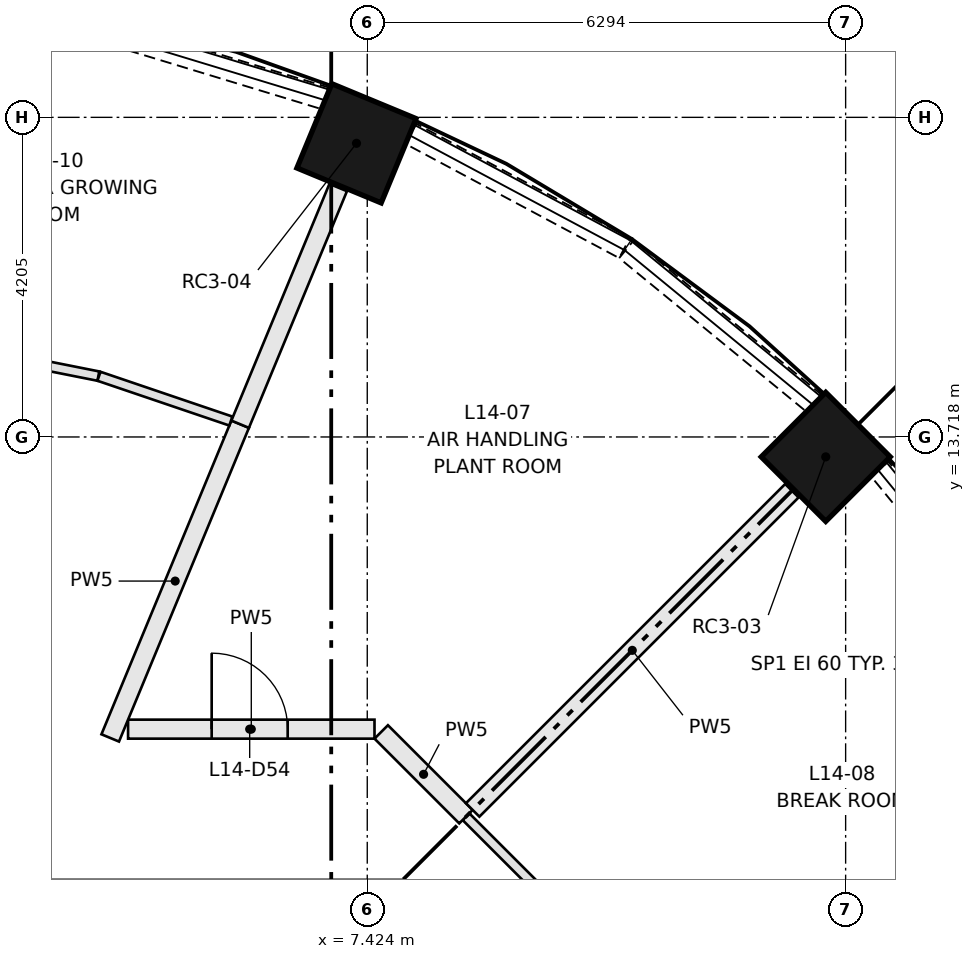
"""IFC4 building model, lengths in metres.
Left out: names, types, materials, properties, quantities, classifications, styles, units other than length and angle.
Written with IfcOpenShell. Run it as: python <this file> out.ifc"""

import sys

from ifc_helpers import new_model, si_unit, direction, frame, frame_2d, origin, origin_2d, place, context, subcontext, project, spatial, rectangle, extrude, element, fill, save


model = new_model("IFC4")
c1 = context("Model", 3, precision=1e-05, world=origin(), true_north=direction((0.0, 1.0)))
c2 = subcontext(c1, "Body", "Model", "MODEL_VIEW")
j1 = project(units=[si_unit("LENGTHUNIT", "METRE"), si_unit("PLANEANGLEUNIT", "RADIAN")], contexts=[c1])
p1 = place(None, origin())
s1 = spatial("IfcSite", under=j1, at=p1, CompositionType="ELEMENT")
p2 = place(p1, origin())
s2 = spatial("IfcBuilding", under=s1, at=p2, CompositionType="ELEMENT")
p3 = place(p2, frame((0.0, 0.0, 55.4)))
s3 = spatial("IfcBuildingStorey", under=s2, at=p3, CompositionType="ELEMENT", Elevation=55.4)
for number, where, z_axis, x_axis in (
    (1, (13.456, 13.456, 0.0), (0.0, 0.0, 1.0), (0.707, 0.707, 0.0)),
    (2, (7.282, 17.582, 0.0), (0.0, 0.0, 1.0), (0.383, 0.924, 0.0)),
):
    element("IfcColumn", number, at=place(p3, frame(where, z_axis=z_axis, x_axis=x_axis)), inside=s3, PredefinedType="COLUMN", context=c2, shape_type="SweptSolid", body=[
        extrude(rectangle(XDim=1.2, YDim=1.2, at=origin_2d()), origin(), (0.0, 0.0, 1.0), 3.65),
    ])
for number, where, z_axis, x_axis in (
    (3, (16.188, 10.833, 0.0), (0.0, 0.0, 1.0), (-0.634, 0.773, 0.0)),
    (4, (13.298, 14.166, 0.0), (0.0, 0.0, 1.0), (-0.773, 0.634, 0.0)),
):
    element("IfcWall", number, at=place(p3, frame(where, z_axis=z_axis, x_axis=x_axis)), inside=s3, PredefinedType="SOLIDWALL", context=c2, shape_type="SweptSolid", body=[
        extrude(rectangle(XDim=3.188, YDim=0.3, at=frame_2d((1.594, 0.0))), origin(), (0.0, 0.0, 1.0), 0.9),
    ])
p4 = place(p3, frame((10.809, 16.204, 0.0), z_axis=(0.0, 0.0, 1.0), x_axis=(-0.881994263934, 0.471260138764, 0.0)))
e5 = element("IfcWall", 5, at=p4, inside=s3, PredefinedType="SOLIDWALL", context=c2, shape_type="SweptSolid", body=[
    extrude(rectangle(XDim=3.187, YDim=0.3, at=frame_2d((1.593, 0.0))), origin(), (0.0, 0.0, 1.0), 0.9),
])
p5 = place(p3, frame((6.865, 18.175, 0.0), z_axis=(0.0, 0.0, 1.0), x_axis=(-0.956849017819, 0.290585541792, 0.0)))
e6 = element("IfcWall", 6, at=p5, inside=s3, PredefinedType="SOLIDWALL", context=c2, shape_type="SweptSolid", body=[
    extrude(rectangle(XDim=3.188, YDim=0.3, at=frame_2d((1.594, 0.0))), origin(), (0.0, 0.0, 1.0), 0.9),
])
p6 = place(p3, frame((8.722, 8.722, 0.0), z_axis=(0.0, 0.0, 1.0), x_axis=(0.70718294931, -0.707030604857, 0.0)))
e7 = element("IfcWall", 7, at=p6, inside=s3, PredefinedType="PARTITIONING", context=c2, shape_type="SweptSolid", body=[
    extrude(rectangle(XDim=1.603, YDim=0.125, at=frame_2d((0.801, 0.0))), origin(), (0.0, 0.0, 1.0), 3.3),
])
p7 = place(p3, frame((4.277, 9.874, 0.0), z_axis=(0.0, 0.0, 1.0), x_axis=(1.0, 0.0, 0.0)))
e8 = element("IfcWall", 8, at=p7, inside=s3, PredefinedType="PARTITIONING", context=c2, shape_type="SweptSolid", body=[
    extrude(rectangle(XDim=3.242, YDim=0.25, at=frame_2d((1.621, 0.0))), origin(), (0.0, 0.0, 1.0), 3.3),
])
p8 = place(p7, frame((1.1, 0.0, 0.0)))
e9 = element("IfcOpeningElement", 9, at=p8, cuts=e8, PredefinedType="OPENING", context=c2, shape_type="SweptSolid", body=[
    extrude(rectangle(XDim=1.0, YDim=2.1, at=frame_2d((0.5, 1.05))), frame((0.0, 0.135, 0.0), z_axis=(0.0, -1.0, 0.0), x_axis=(1.0, 0.0, 0.0)), (0.0, 0.0, 1.0), 0.27),
])
p9 = place(p3, frame((7.608, 9.837, 0.0), z_axis=(0.0, 0.0, 1.0), x_axis=(0.707029353672, -0.707184200224, 0.0)))
e10 = element("IfcWall", 10, at=p9, inside=s3, PredefinedType="PARTITIONING", context=c2, shape_type="SweptSolid", body=[
    extrude(rectangle(XDim=1.577, YDim=0.25, at=frame_2d((0.788, 0.0))), origin(), (0.0, 0.0, 1.0), 3.3),
])
p10 = place(p3, frame((13.011, 13.011, 0.0), z_axis=(0.0, 0.0, 1.0), x_axis=(-0.707106781187, -0.707106781187, 0.0)))
e11 = element("IfcWall", 11, at=p10, inside=s3, PredefinedType="PARTITIONING", context=c2, shape_type="SweptSolid", body=[
    extrude(rectangle(XDim=5.94, YDim=0.25, at=frame_2d((2.97, 0.0))), origin(), (0.0, 0.0, 1.0), 3.3),
])
p11 = place(p3, frame((4.042, 9.759, 0.0), z_axis=(0.0, 0.0, 1.0), x_axis=(0.382697682956, 0.923873629595, 0.0)))
e12 = element("IfcWall", 12, at=p11, inside=s3, PredefinedType="PARTITIONING", context=c2, shape_type="SweptSolid", body=[
    extrude(rectangle(XDim=4.468, YDim=0.25, at=frame_2d((2.234, 0.0))), origin(), (0.0, 0.0, 1.0), 3.3),
])
p12 = place(p3, frame((5.752, 13.886, 0.0), z_axis=(0.0, 0.0, 1.0), x_axis=(0.382716478617, 0.923865843613, 0.0)))
e13 = element("IfcWall", 13, at=p12, inside=s3, PredefinedType="PARTITIONING", context=c2, shape_type="SweptSolid", body=[
    extrude(rectangle(XDim=3.37, YDim=0.25, at=frame_2d((1.685, 0.0))), origin(), (0.0, 0.0, 1.0), 3.3),
])
p13 = place(p3, frame((1.966, 14.901, 0.0), z_axis=(0.0, 0.0, 1.0), x_axis=(0.980795915473, -0.19503684829, 0.0)))
e14 = element("IfcWall", 14, at=p13, inside=s3, PredefinedType="PARTITIONING", context=c2, shape_type="SweptSolid", body=[
    extrude(rectangle(XDim=1.958, YDim=0.125, at=frame_2d((0.979, 0.0))), origin(), (0.0, 0.0, 1.0), 3.3),
])
p14 = place(p3, frame((3.894, 14.517, 0.0), z_axis=(0.0, 0.0, 1.0), x_axis=(0.946909907848, -0.321499030201, 0.0)))
e15 = element("IfcWall", 15, at=p14, inside=s3, PredefinedType="PARTITIONING", context=c2, shape_type="SweptSolid", body=[
    extrude(rectangle(XDim=1.832, YDim=0.125, at=frame_2d((0.916, 0.0))), origin(), (0.0, 0.0, 1.0), 3.3),
])
p15 = place(p8, origin())
e16 = element("IfcDoor", 16, at=p15, inside=s3, OperationType="SINGLE_SWING_LEFT", PredefinedType="DOOR", context=c2, shape_type="SweptSolid", body=[
    extrude(rectangle(XDim=1.0, YDim=2.1, at=frame_2d((0.5, 1.05))), frame((0.0, 0.025, 0.0), z_axis=(0.0, -1.0, 0.0), x_axis=(1.0, 0.0, 0.0)), (0.0, 0.0, 1.0), 0.05),
])
fill(e9, e16)
save(model, sys.argv[1])
